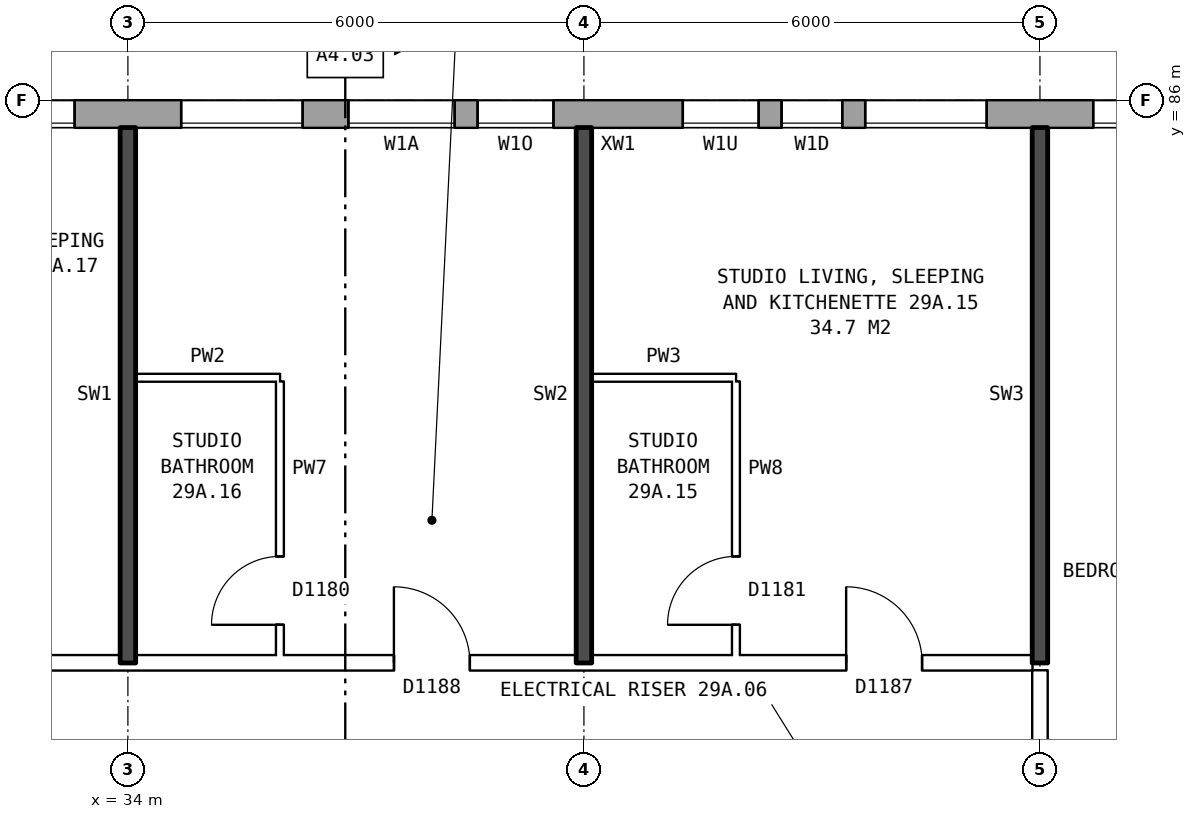
"""IFC4 building model, lengths in metres.
Left out: names, types, materials, properties, quantities, classifications, styles, units other than length and angle.
Written with IfcOpenShell. Run it as: python <this file> out.ifc"""

import sys

from ifc_helpers import new_model, si_unit, direction, frame, frame_2d, origin, place, context, subcontext, project, spatial, rectangle, extrude, element, fill, save


model = new_model("IFC4")
c1 = context("Model", 3, precision=1e-05, world=origin(), true_north=direction((0.0, 1.0)))
c2 = subcontext(c1, "Body", "Model", "MODEL_VIEW")
j1 = project(units=[si_unit("LENGTHUNIT", "METRE"), si_unit("PLANEANGLEUNIT", "RADIAN")], contexts=[c1])
p1 = place(None, origin())
s1 = spatial("IfcSite", under=j1, at=p1, CompositionType="ELEMENT")
p2 = place(p1, origin())
s2 = spatial("IfcBuilding", under=s1, at=p2, CompositionType="ELEMENT")
p3 = place(p2, frame((0.0, 0.0, 105.7)))
s3 = spatial("IfcBuildingStorey", under=s2, at=p3, CompositionType="ELEMENT", Elevation=105.7)
p4 = place(p3, frame((72.925, 85.82, 0.0), z_axis=(0.0, 0.0, 1.0), x_axis=(-1.0, 0.0, 0.0)))
e1 = element("IfcWall", 1, at=p4, inside=s3, PredefinedType="STANDARD", context=c2, shape_type="SweptSolid", body=[
    extrude(rectangle(XDim=44.851, YDim=0.36, at=frame_2d((22.425, 0.0))), origin(), (0.0, 0.0, 1.0), 2.85),
])
p5 = place(p4, frame((0.625, 0.0, 0.8)))
e2 = element("IfcOpeningElement", 2, at=p5, cuts=e1, PredefinedType="OPENING", context=c2, shape_type="SweptSolid", body=[
    extrude(rectangle(XDim=1.6, YDim=1.8, at=frame_2d((0.8, 0.9))), frame((0.0, 0.19, 0.0), z_axis=(0.0, -1.0, 0.0), x_axis=(1.0, 0.0, 0.0)), (0.0, 0.0, 1.0), 0.38),
])
p6 = place(p4, frame((3.625, 0.0, 0.8)))
e3 = element("IfcOpeningElement", 3, at=p6, cuts=e1, PredefinedType="OPENING", context=c2, shape_type="SweptSolid", body=[
    extrude(rectangle(XDim=1.6, YDim=1.8, at=frame_2d((0.8, 0.9))), frame((0.0, 0.19, 0.0), z_axis=(0.0, -1.0, 0.0), x_axis=(1.0, 0.0, 0.0)), (0.0, 0.0, 1.0), 0.38),
])
p7 = place(p4, frame((6.625, 0.0, 0.8)))
e4 = element("IfcOpeningElement", 4, at=p7, cuts=e1, PredefinedType="OPENING", context=c2, shape_type="SweptSolid", body=[
    extrude(rectangle(XDim=1.6, YDim=1.8, at=frame_2d((0.8, 0.9))), frame((0.0, 0.19, 0.0), z_axis=(0.0, -1.0, 0.0), x_axis=(1.0, 0.0, 0.0)), (0.0, 0.0, 1.0), 0.38),
])
p8 = place(p4, frame((9.125, 0.0, 0.8)))
e5 = element("IfcOpeningElement", 5, at=p8, cuts=e1, PredefinedType="OPENING", context=c2, shape_type="SweptSolid", body=[
    extrude(rectangle(XDim=1.6, YDim=1.8, at=frame_2d((0.8, 0.9))), frame((0.0, 0.19, 0.0), z_axis=(0.0, -1.0, 0.0), x_axis=(1.0, 0.0, 0.0)), (0.0, 0.0, 1.0), 0.38),
])
p9 = place(p4, frame((12.825, 0.0, 0.55)))
e6 = element("IfcOpeningElement", 6, at=p9, cuts=e1, PredefinedType="OPENING", context=c2, shape_type="SweptSolid", body=[
    extrude(rectangle(XDim=0.6, YDim=0.9, at=frame_2d((0.3, 0.45))), frame((0.0, 0.19, 0.0), z_axis=(0.0, -1.0, 0.0), x_axis=(1.0, 0.0, 0.0)), (0.0, 0.0, 1.0), 0.38),
])
p10 = place(p4, frame((15.625, 0.0, 0.8)))
e7 = element("IfcOpeningElement", 7, at=p10, cuts=e1, PredefinedType="OPENING", context=c2, shape_type="SweptSolid", body=[
    extrude(rectangle(XDim=1.6, YDim=1.8, at=frame_2d((0.8, 0.9))), frame((0.0, 0.19, 0.0), z_axis=(0.0, -1.0, 0.0), x_axis=(1.0, 0.0, 0.0)), (0.0, 0.0, 1.0), 0.38),
])
p11 = place(p4, frame((18.625, 0.0, 0.8)))
e8 = element("IfcOpeningElement", 8, at=p11, cuts=e1, PredefinedType="OPENING", context=c2, shape_type="SweptSolid", body=[
    extrude(rectangle(XDim=1.6, YDim=1.8, at=frame_2d((0.8, 0.9))), frame((0.0, 0.19, 0.0), z_axis=(0.0, -1.0, 0.0), x_axis=(1.0, 0.0, 0.0)), (0.0, 0.0, 1.0), 0.38),
])
p12 = place(p4, frame((21.625, 0.0, 0.8)))
e9 = element("IfcOpeningElement", 9, at=p12, cuts=e1, PredefinedType="OPENING", context=c2, shape_type="SweptSolid", body=[
    extrude(rectangle(XDim=1.6, YDim=1.8, at=frame_2d((0.8, 0.9))), frame((0.0, 0.19, 0.0), z_axis=(0.0, -1.0, 0.0), x_axis=(1.0, 0.0, 0.0)), (0.0, 0.0, 1.0), 0.38),
])
p13 = place(p4, frame((24.625, 0.0, 0.8)))
e10 = element("IfcOpeningElement", 10, at=p13, cuts=e1, PredefinedType="OPENING", context=c2, shape_type="SweptSolid", body=[
    extrude(rectangle(XDim=1.6, YDim=1.8, at=frame_2d((0.8, 0.9))), frame((0.0, 0.19, 0.0), z_axis=(0.0, -1.0, 0.0), x_axis=(1.0, 0.0, 0.0)), (0.0, 0.0, 1.0), 0.38),
])
p14 = place(p4, frame((27.625, 0.0, 0.8)))
e11 = element("IfcOpeningElement", 11, at=p14, cuts=e1, PredefinedType="OPENING", context=c2, shape_type="SweptSolid", body=[
    extrude(rectangle(XDim=1.6, YDim=1.8, at=frame_2d((0.8, 0.9))), frame((0.0, 0.19, 0.0), z_axis=(0.0, -1.0, 0.0), x_axis=(1.0, 0.0, 0.0)), (0.0, 0.0, 1.0), 0.38),
])
p15 = place(p4, frame((29.525, 0.0, 0.8)))
e12 = element("IfcOpeningElement", 12, at=p15, cuts=e1, PredefinedType="OPENING", context=c2, shape_type="SweptSolid", body=[
    extrude(rectangle(XDim=0.8, YDim=1.8, at=frame_2d((0.4, 0.9))), frame((0.0, 0.19, 0.0), z_axis=(0.0, -1.0, 0.0), x_axis=(1.0, 0.0, 0.0)), (0.0, 0.0, 1.0), 0.38),
])
p16 = place(p4, frame((33.325, 0.0, 1.4)))
e13 = element("IfcOpeningElement", 13, at=p16, cuts=e1, PredefinedType="OPENING", context=c2, shape_type="SweptSolid", body=[
    extrude(rectangle(XDim=1.0, YDim=1.2, at=frame_2d((0.5, 0.6))), frame((0.0, 0.19, 0.0), z_axis=(0.0, -1.0, 0.0), x_axis=(1.0, 0.0, 0.0)), (0.0, 0.0, 1.0), 0.38),
])
p17 = place(p4, frame((36.625, 0.0, 0.8)))
e14 = element("IfcOpeningElement", 14, at=p17, cuts=e1, PredefinedType="OPENING", context=c2, shape_type="SweptSolid", body=[
    extrude(rectangle(XDim=1.6, YDim=1.8, at=frame_2d((0.8, 0.9))), frame((0.0, 0.19, 0.0), z_axis=(0.0, -1.0, 0.0), x_axis=(1.0, 0.0, 0.0)), (0.0, 0.0, 1.0), 0.38),
])
p18 = place(p4, frame((39.625, 0.0, 0.8)))
e15 = element("IfcOpeningElement", 15, at=p18, cuts=e1, PredefinedType="OPENING", context=c2, shape_type="SweptSolid", body=[
    extrude(rectangle(XDim=1.6, YDim=1.8, at=frame_2d((0.8, 0.9))), frame((0.0, 0.19, 0.0), z_axis=(0.0, -1.0, 0.0), x_axis=(1.0, 0.0, 0.0)), (0.0, 0.0, 1.0), 0.38),
])
p19 = place(p4, frame((42.625, 0.0, 0.8)))
e16 = element("IfcOpeningElement", 16, at=p19, cuts=e1, PredefinedType="OPENING", context=c2, shape_type="SweptSolid", body=[
    extrude(rectangle(XDim=1.6, YDim=1.8, at=frame_2d((0.8, 0.9))), frame((0.0, 0.19, 0.0), z_axis=(0.0, -1.0, 0.0), x_axis=(1.0, 0.0, 0.0)), (0.0, 0.0, 1.0), 0.38),
])
p20 = place(p4, frame((11.025, 0.0, 1.5)))
e17 = element("IfcOpeningElement", 17, at=p20, cuts=e1, PredefinedType="OPENING", context=c2, shape_type="SweptSolid", body=[
    extrude(rectangle(XDim=0.6, YDim=0.9, at=frame_2d((0.3, 0.45))), frame((0.0, 0.19, 0.0), z_axis=(0.0, -1.0, 0.0), x_axis=(1.0, 0.0, 0.0)), (0.0, 0.0, 1.0), 0.38),
])
p21 = place(p4, frame((13.725, 0.0, 0.55)))
e18 = element("IfcOpeningElement", 18, at=p21, cuts=e1, PredefinedType="OPENING", context=c2, shape_type="SweptSolid", body=[
    extrude(rectangle(XDim=1.0, YDim=1.5, at=frame_2d((0.5, 0.75))), frame((0.0, 0.19, 0.0), z_axis=(0.0, -1.0, 0.0), x_axis=(1.0, 0.0, 0.0)), (0.0, 0.0, 1.0), 0.38),
])
p22 = place(p4, frame((30.625, 0.0, 0.8)))
e19 = element("IfcOpeningElement", 19, at=p22, cuts=e1, PredefinedType="OPENING", context=c2, shape_type="SweptSolid", body=[
    extrude(rectangle(XDim=1.0, YDim=0.9, at=frame_2d((0.5, 0.45))), frame((0.0, 0.19, 0.0), z_axis=(0.0, -1.0, 0.0), x_axis=(1.0, 0.0, 0.0)), (0.0, 0.0, 1.0), 0.38),
])
p23 = place(p4, frame((34.625, 0.0, 0.8)))
e20 = element("IfcOpeningElement", 20, at=p23, cuts=e1, PredefinedType="OPENING", context=c2, shape_type="SweptSolid", body=[
    extrude(rectangle(XDim=1.4, YDim=1.8, at=frame_2d((0.7, 0.9))), frame((0.0, 0.19, 0.0), z_axis=(0.0, -1.0, 0.0), x_axis=(1.0, 0.0, 0.0)), (0.0, 0.0, 1.0), 0.38),
])
p24 = place(p3, frame((25.36, 78.6, 0.0), z_axis=(0.0, 0.0, 1.0), x_axis=(1.0, 0.0, 0.0)))
e21 = element("IfcWall", 21, at=p24, inside=s3, PredefinedType="PARTITIONING", context=c2, shape_type="SweptSolid", body=[
    extrude(rectangle(XDim=20.54, YDim=0.2, at=frame_2d((10.27, 0.0))), origin(), (0.0, 0.0, 1.0), 2.85),
])
p25 = place(p24, frame((18.09, 0.0, 0.0)))
e22 = element("IfcOpeningElement", 22, at=p25, cuts=e21, PredefinedType="OPENING", context=c2, shape_type="SweptSolid", body=[
    extrude(rectangle(XDim=1.0, YDim=2.1, at=frame_2d((0.5, 1.05))), frame((0.0, 0.11, 0.0), z_axis=(0.0, -1.0, 0.0), x_axis=(1.0, 0.0, 0.0)), (0.0, 0.0, 1.0), 0.22),
])
p26 = place(p24, frame((12.14, 0.0, 0.0)))
e23 = element("IfcOpeningElement", 23, at=p26, cuts=e21, PredefinedType="OPENING", context=c2, shape_type="SweptSolid", body=[
    extrude(rectangle(XDim=1.0, YDim=2.1, at=frame_2d((0.5, 1.05))), frame((0.0, 0.11, 0.0), z_axis=(0.0, -1.0, 0.0), x_axis=(1.0, 0.0, 0.0)), (0.0, 0.0, 1.0), 0.22),
])
p27 = place(p24, frame((6.34, 0.0, 0.0)))
e24 = element("IfcOpeningElement", 24, at=p27, cuts=e21, PredefinedType="OPENING", context=c2, shape_type="SweptSolid", body=[
    extrude(rectangle(XDim=1.0, YDim=2.1, at=frame_2d((0.5, 1.05))), frame((0.0, 0.11, 0.0), z_axis=(0.0, -1.0, 0.0), x_axis=(1.0, 0.0, 0.0)), (0.0, 0.0, 1.0), 0.22),
])
for number, where, z_axis, x_axis in (
    (25, (34.1, 82.35, 0.0), (0.0, 0.0, 1.0), (1.0, 0.0, 0.0)),
    (26, (40.1, 82.35, 0.0), (0.0, 0.0, 1.0), (1.0, 0.0, 0.0)),
):
    element("IfcWall", number, at=place(p3, frame(where, z_axis=z_axis, x_axis=x_axis)), inside=s3, PredefinedType="PARTITIONING", context=c2, shape_type="SweptSolid", body=[
        extrude(rectangle(XDim=1.9, YDim=0.1, at=frame_2d((0.95, 0.0))), origin(), (0.0, 0.0, 1.0), 2.85),
    ])
p28 = place(p3, frame((34.0, 78.6, 0.0), z_axis=(0.0, 0.0, 1.0), x_axis=(0.0, 1.0, 0.0)))
e27 = element("IfcWall", 27, at=p28, inside=s3, PredefinedType="SOLIDWALL", context=c2, shape_type="SweptSolid", body=[
    extrude(rectangle(XDim=7.04, YDim=0.2, at=frame_2d((3.52, 0.0))), origin(), (0.0, 0.0, 1.0), 2.85),
])
p29 = place(p3, frame((36.0, 78.7, 0.0), z_axis=(0.0, 0.0, 1.0), x_axis=(0.0, 1.0, 0.0)))
e28 = element("IfcWall", 28, at=p29, inside=s3, PredefinedType="PARTITIONING", context=c2, shape_type="SweptSolid", body=[
    extrude(rectangle(XDim=3.6, YDim=0.1, at=frame_2d((1.8, 0.0))), origin(), (0.0, 0.0, 1.0), 2.85),
])
p30 = place(p29, frame((0.4, 0.0, 0.0)))
e29 = element("IfcOpeningElement", 29, at=p30, cuts=e28, PredefinedType="OPENING", context=c2, shape_type="SweptSolid", body=[
    extrude(rectangle(XDim=0.9, YDim=2.1, at=frame_2d((0.45, 1.05))), frame((0.0, 0.06, 0.0), z_axis=(0.0, -1.0, 0.0), x_axis=(1.0, 0.0, 0.0)), (0.0, 0.0, 1.0), 0.12),
])
p31 = place(p3, frame((40.0, 78.6, 0.0), z_axis=(0.0, 0.0, 1.0), x_axis=(0.0, 1.0, 0.0)))
e30 = element("IfcWall", 30, at=p31, inside=s3, PredefinedType="SOLIDWALL", context=c2, shape_type="SweptSolid", body=[
    extrude(rectangle(XDim=7.04, YDim=0.2, at=frame_2d((3.52, 0.0))), origin(), (0.0, 0.0, 1.0), 2.85),
])
p32 = place(p3, frame((42.0, 78.7, 0.0), z_axis=(0.0, 0.0, 1.0), x_axis=(0.0, 1.0, 0.0)))
e31 = element("IfcWall", 31, at=p32, inside=s3, PredefinedType="PARTITIONING", context=c2, shape_type="SweptSolid", body=[
    extrude(rectangle(XDim=3.6, YDim=0.1, at=frame_2d((1.8, 0.0))), origin(), (0.0, 0.0, 1.0), 2.85),
])
p33 = place(p32, frame((0.4, 0.0, 0.0)))
e32 = element("IfcOpeningElement", 32, at=p33, cuts=e31, PredefinedType="OPENING", context=c2, shape_type="SweptSolid", body=[
    extrude(rectangle(XDim=0.9, YDim=2.1, at=frame_2d((0.45, 1.05))), frame((0.0, 0.06, 0.0), z_axis=(0.0, -1.0, 0.0), x_axis=(1.0, 0.0, 0.0)), (0.0, 0.0, 1.0), 0.12),
])
p34 = place(p3, frame((46.0, 76.3, 0.0), z_axis=(0.0, 0.0, 1.0), x_axis=(0.0, 1.0, 0.0)))
e33 = element("IfcWall", 33, at=p34, inside=s3, PredefinedType="PARTITIONING", context=c2, shape_type="SweptSolid", body=[
    extrude(rectangle(XDim=2.2, YDim=0.2, at=frame_2d((1.1, 0.0))), origin(), (0.0, 0.0, 1.0), 2.85),
])
p35 = place(p3, frame((46.0, 78.6, 0.0), z_axis=(0.0, 0.0, 1.0), x_axis=(0.0, 1.0, 0.0)))
e34 = element("IfcWall", 34, at=p35, inside=s3, PredefinedType="SOLIDWALL", context=c2, shape_type="SweptSolid", body=[
    extrude(rectangle(XDim=7.04, YDim=0.2, at=frame_2d((3.52, 0.0))), origin(), (0.0, 0.0, 1.0), 2.85),
])
p36 = place(p13, origin())
e35 = element("IfcWindow", 35, at=p36, inside=s3, PartitioningType="SINGLE_PANEL", PredefinedType="WINDOW", context=c2, shape_type="SweptSolid", body=[
    extrude(rectangle(XDim=1.6, YDim=1.8, at=frame_2d((0.8, 0.9))), frame((0.0, 0.15, 0.0), z_axis=(0.0, -1.0, 0.0), x_axis=(1.0, 0.0, 0.0)), (0.0, 0.0, 1.0), 0.06),
])
fill(e10, e35)
p37 = place(p14, origin())
e36 = element("IfcWindow", 36, at=p37, inside=s3, PartitioningType="SINGLE_PANEL", PredefinedType="WINDOW", context=c2, shape_type="SweptSolid", body=[
    extrude(rectangle(XDim=1.6, YDim=1.8, at=frame_2d((0.8, 0.9))), frame((0.0, 0.15, 0.0), z_axis=(0.0, -1.0, 0.0), x_axis=(1.0, 0.0, 0.0)), (0.0, 0.0, 1.0), 0.06),
])
fill(e11, e36)
p38 = place(p15, origin())
e37 = element("IfcWindow", 37, at=p38, inside=s3, PartitioningType="SINGLE_PANEL", PredefinedType="WINDOW", context=c2, shape_type="SweptSolid", body=[
    extrude(rectangle(XDim=0.8, YDim=1.8, at=frame_2d((0.4, 0.9))), frame((0.0, 0.15, 0.0), z_axis=(0.0, -1.0, 0.0), x_axis=(1.0, 0.0, 0.0)), (0.0, 0.0, 1.0), 0.06),
])
fill(e12, e37)
p39 = place(p16, origin())
e38 = element("IfcWindow", 38, at=p39, inside=s3, PartitioningType="SINGLE_PANEL", PredefinedType="WINDOW", context=c2, shape_type="SweptSolid", body=[
    extrude(rectangle(XDim=1.0, YDim=1.2, at=frame_2d((0.5, 0.6))), frame((0.0, 0.15, 0.0), z_axis=(0.0, -1.0, 0.0), x_axis=(1.0, 0.0, 0.0)), (0.0, 0.0, 1.0), 0.06),
])
fill(e13, e38)
p40 = place(p17, origin())
e39 = element("IfcWindow", 39, at=p40, inside=s3, PartitioningType="SINGLE_PANEL", PredefinedType="WINDOW", context=c2, shape_type="SweptSolid", body=[
    extrude(rectangle(XDim=1.6, YDim=1.8, at=frame_2d((0.8, 0.9))), frame((0.0, 0.15, 0.0), z_axis=(0.0, -1.0, 0.0), x_axis=(1.0, 0.0, 0.0)), (0.0, 0.0, 1.0), 0.06),
])
fill(e14, e39)
p41 = place(p18, origin())
e40 = element("IfcWindow", 40, at=p41, inside=s3, PartitioningType="SINGLE_PANEL", PredefinedType="WINDOW", context=c2, shape_type="SweptSolid", body=[
    extrude(rectangle(XDim=1.6, YDim=1.8, at=frame_2d((0.8, 0.9))), frame((0.0, 0.15, 0.0), z_axis=(0.0, -1.0, 0.0), x_axis=(1.0, 0.0, 0.0)), (0.0, 0.0, 1.0), 0.06),
])
fill(e15, e40)
p42 = place(p25, origin())
e41 = element("IfcDoor", 41, at=p42, inside=s3, OperationType="SINGLE_SWING_LEFT", PredefinedType="DOOR", context=c2, shape_type="SweptSolid", body=[
    extrude(rectangle(XDim=1.0, YDim=2.1, at=frame_2d((0.5, 1.05))), frame((0.0, 0.025, 0.0), z_axis=(0.0, -1.0, 0.0), x_axis=(1.0, 0.0, 0.0)), (0.0, 0.0, 1.0), 0.05),
])
fill(e22, e41)
p43 = place(p33, origin())
e42 = element("IfcDoor", 42, at=p43, inside=s3, OperationType="SINGLE_SWING_LEFT", PredefinedType="DOOR", context=c2, shape_type="SweptSolid", body=[
    extrude(rectangle(XDim=0.9, YDim=2.1, at=frame_2d((0.45, 1.05))), frame((0.0, 0.025, 0.0), z_axis=(0.0, -1.0, 0.0), x_axis=(1.0, 0.0, 0.0)), (0.0, 0.0, 1.0), 0.05),
])
fill(e32, e42)
p44 = place(p26, origin())
e43 = element("IfcDoor", 43, at=p44, inside=s3, OperationType="SINGLE_SWING_LEFT", PredefinedType="DOOR", context=c2, shape_type="SweptSolid", body=[
    extrude(rectangle(XDim=1.0, YDim=2.1, at=frame_2d((0.5, 1.05))), frame((0.0, 0.025, 0.0), z_axis=(0.0, -1.0, 0.0), x_axis=(1.0, 0.0, 0.0)), (0.0, 0.0, 1.0), 0.05),
])
fill(e23, e43)
p45 = place(p30, origin())
e44 = element("IfcDoor", 44, at=p45, inside=s3, OperationType="SINGLE_SWING_LEFT", PredefinedType="DOOR", context=c2, shape_type="SweptSolid", body=[
    extrude(rectangle(XDim=0.9, YDim=2.1, at=frame_2d((0.45, 1.05))), frame((0.0, 0.025, 0.0), z_axis=(0.0, -1.0, 0.0), x_axis=(1.0, 0.0, 0.0)), (0.0, 0.0, 1.0), 0.05),
])
fill(e29, e44)
p46 = place(p22, origin())
e45 = element("IfcWindow", 45, at=p46, inside=s3, PartitioningType="SINGLE_PANEL", PredefinedType="WINDOW", context=c2, shape_type="SweptSolid", body=[
    extrude(rectangle(XDim=1.0, YDim=0.9, at=frame_2d((0.5, 0.45))), frame((0.0, 0.15, 0.0), z_axis=(0.0, -1.0, 0.0), x_axis=(1.0, 0.0, 0.0)), (0.0, 0.0, 1.0), 0.06),
])
fill(e19, e45)
p47 = place(p23, origin())
e46 = element("IfcWindow", 46, at=p47, inside=s3, PartitioningType="SINGLE_PANEL", PredefinedType="WINDOW", context=c2, shape_type="SweptSolid", body=[
    extrude(rectangle(XDim=1.4, YDim=1.8, at=frame_2d((0.7, 0.9))), frame((0.0, 0.15, 0.0), z_axis=(0.0, -1.0, 0.0), x_axis=(1.0, 0.0, 0.0)), (0.0, 0.0, 1.0), 0.06),
])
fill(e20, e46)
save(model, sys.argv[1])
